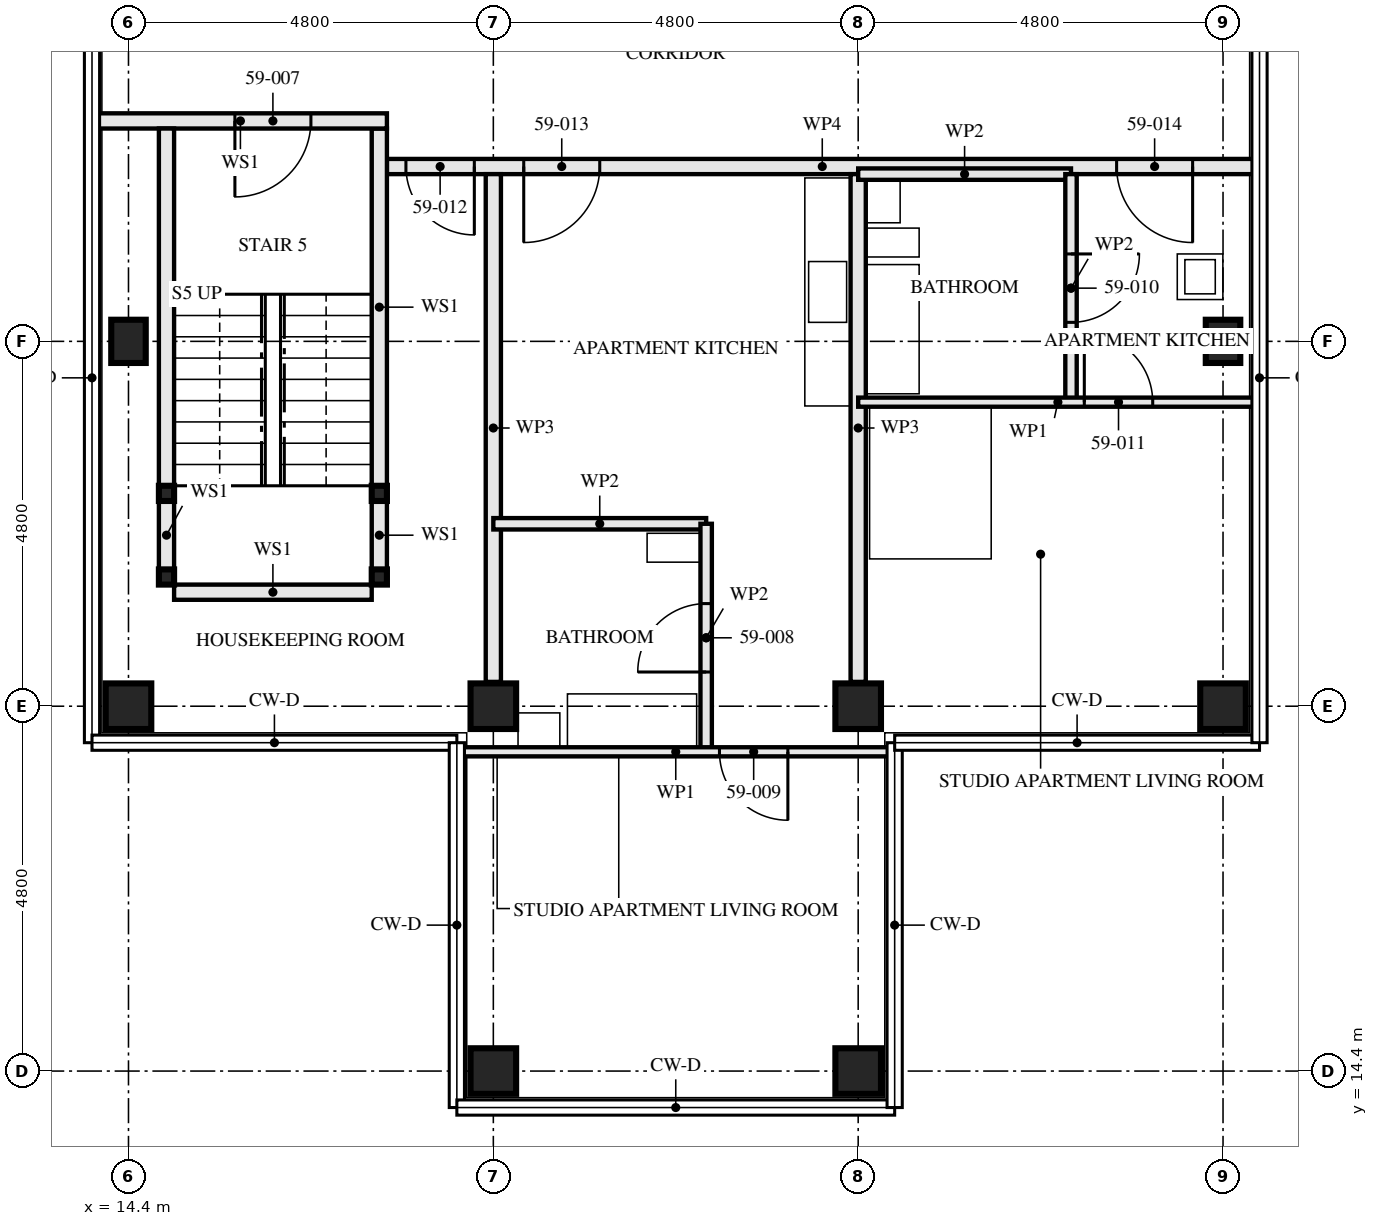
"""IFC4 building model, lengths in metres.
Left out: names, types, materials, properties, quantities, classifications, styles, units other than length and angle.
Written with IfcOpenShell. Run it as: python <this file> out.ifc"""

import sys

from ifc_helpers import new_model, si_unit, direction, frame, frame_2d, origin, origin_2d, place, context, subcontext, project, spatial, rectangle, hollow_rectangle, i_section, extrude, element, fill, save


model = new_model("IFC4")
c1 = context("Model", 3, precision=1e-05, world=origin(), true_north=direction((0.0, 1.0)))
c2 = subcontext(c1, "Body", "Model", "MODEL_VIEW")
j1 = project(units=[si_unit("LENGTHUNIT", "METRE"), si_unit("PLANEANGLEUNIT", "RADIAN")], contexts=[c1])
p1 = place(None, origin())
s1 = spatial("IfcSite", under=j1, at=p1, CompositionType="ELEMENT")
p2 = place(p1, origin())
s2 = spatial("IfcBuilding", under=s1, at=p2, CompositionType="ELEMENT")
p3 = place(p2, frame((0.0, 0.0, 215.5)))
s3 = spatial("IfcBuildingStorey", under=s2, at=p3, CompositionType="ELEMENT", Elevation=215.5)
p4 = place(p3, frame((14.4, 19.2, 0.0), z_axis=(0.0, 0.0, 1.0), x_axis=(0.0, 1.0, 0.0)))
e1 = element("IfcColumn", 1, at=p4, inside=s3, PredefinedType="COLUMN", context=c2, shape_type="SweptSolid", body=[
    extrude(hollow_rectangle(XDim=0.6, YDim=0.6, WallThickness=0.05, at=origin_2d()), origin(), (0.0, 0.0, 1.0), 3.5),
])
p5 = place(p3, frame((14.4, 24.0, 0.0), z_axis=(0.0, 0.0, 1.0), x_axis=(1.0, 0.0, 0.0)))
e2 = element("IfcColumn", 2, at=p5, inside=s3, PredefinedType="COLUMN", context=c2, shape_type="SweptSolid", body=[
    extrude(i_section(OverallWidth=0.454, OverallDepth=0.569, WebThickness=0.078, FlangeThickness=0.125, FilletRadius=0.015, at=origin_2d()), origin(), (0.0, 0.0, 1.0), 3.5),
])
for number, where, z_axis, x_axis in (
    (3, (19.2, 14.4, 0.0), (0.0, 0.0, 1.0), (0.0, 1.0, 0.0)),
    (4, (19.2, 19.2, 0.0), (0.0, 0.0, 1.0), (0.0, 1.0, 0.0)),
    (5, (24.0, 14.4, 0.0), (0.0, 0.0, 1.0), (0.0, 1.0, 0.0)),
    (6, (24.0, 19.2, 0.0), (0.0, 0.0, 1.0), (0.0, 1.0, 0.0)),
    (7, (28.8, 19.2, 0.0), (0.0, 0.0, 1.0), (0.0, 1.0, 0.0)),
):
    element("IfcColumn", number, at=place(p3, frame(where, z_axis=z_axis, x_axis=x_axis)), inside=s3, PredefinedType="COLUMN", context=c2, shape_type="SweptSolid", body=[
        extrude(hollow_rectangle(XDim=0.6, YDim=0.6, WallThickness=0.05, at=origin_2d()), origin(), (0.0, 0.0, 1.0), 3.5),
    ])
p6 = place(p3, frame((28.8, 24.0, 0.0), z_axis=(0.0, 0.0, 1.0), x_axis=(1.0, 0.0, 0.0)))
e8 = element("IfcColumn", 8, at=p6, inside=s3, PredefinedType="COLUMN", context=c2, shape_type="SweptSolid", body=[
    extrude(i_section(OverallWidth=0.454, OverallDepth=0.569, WebThickness=0.078, FlangeThickness=0.125, FilletRadius=0.015, at=origin_2d()), origin(), (0.0, 0.0, 1.0), 3.5),
])
for number, where, z_axis, x_axis in (
    (9, (14.9, 20.9, 0.0), (0.0, 0.0, 1.0), (1.0, 0.0, 0.0)),
    (10, (17.7, 20.9, 0.0), (0.0, 0.0, 1.0), (1.0, 0.0, 0.0)),
    (11, (14.9, 22.0, 0.0), (0.0, 0.0, 1.0), (1.0, 0.0, 0.0)),
    (12, (17.7, 22.0, 0.0), (0.0, 0.0, 1.0), (1.0, 0.0, 0.0)),
):
    element("IfcColumn", number, at=place(p3, frame(where, z_axis=z_axis, x_axis=x_axis)), inside=s3, PredefinedType="COLUMN", context=c2, shape_type="SweptSolid", body=[
        extrude(hollow_rectangle(XDim=0.2, YDim=0.2, WallThickness=0.008, at=origin_2d()), origin(), (0.0, 0.0, 1.0), 3.33),
    ])
p7 = place(p3, frame((14.9, 21.0, 0.0), z_axis=(0.0, 0.0, 1.0), x_axis=(0.0, 1.0, 0.0)))
e13 = element("IfcWall", 13, at=p7, inside=s3, PredefinedType="SOLIDWALL", context=c2, shape_type="SweptSolid", body=[
    extrude(rectangle(XDim=0.9, YDim=0.2, at=frame_2d((0.45, 0.0))), origin(), (0.0, 0.0, 1.0), 2.99),
])
p8 = place(p3, frame((14.9, 22.1, 0.0), z_axis=(0.0, 0.0, 1.0), x_axis=(0.0, 1.0, 0.0)))
e14 = element("IfcWall", 14, at=p8, inside=s3, PredefinedType="SOLIDWALL", context=c2, shape_type="SweptSolid", body=[
    extrude(rectangle(XDim=4.7, YDim=0.2, at=frame_2d((2.35, 0.0))), origin(), (0.0, 0.0, 1.0), 2.99),
])
p9 = place(p3, frame((17.7, 21.0, 0.0), z_axis=(0.0, 0.0, 1.0), x_axis=(0.0, 1.0, 0.0)))
e15 = element("IfcWall", 15, at=p9, inside=s3, PredefinedType="SOLIDWALL", context=c2, shape_type="SweptSolid", body=[
    extrude(rectangle(XDim=0.9, YDim=0.2, at=frame_2d((0.45, 0.0))), origin(), (0.0, 0.0, 1.0), 2.99),
])
p10 = place(p3, frame((17.7, 22.1, 0.0), z_axis=(0.0, 0.0, 1.0), x_axis=(0.0, 1.0, 0.0)))
e16 = element("IfcWall", 16, at=p10, inside=s3, PredefinedType="SOLIDWALL", context=c2, shape_type="SweptSolid", body=[
    extrude(rectangle(XDim=4.7, YDim=0.2, at=frame_2d((2.35, 0.0))), origin(), (0.0, 0.0, 1.0), 2.99),
])
p11 = place(p3, frame((15.0, 20.7, 0.0), z_axis=(0.0, 0.0, 1.0), x_axis=(1.0, 0.0, 0.0)))
e17 = element("IfcWall", 17, at=p11, inside=s3, PredefinedType="SOLIDWALL", context=c2, shape_type="SweptSolid", body=[
    extrude(rectangle(XDim=2.6, YDim=0.2, at=frame_2d((1.3, 0.0))), origin(), (0.0, 0.0, 1.0), 3.33),
])
p12 = place(p3, frame((13.945, 26.9, 0.0), z_axis=(0.0, 0.0, 1.0), x_axis=(1.0, 0.0, 0.0)))
e18 = element("IfcWall", 18, at=p12, inside=s3, PredefinedType="SOLIDWALL", context=c2, shape_type="SweptSolid", body=[
    extrude(rectangle(XDim=3.855, YDim=0.2, at=frame_2d((1.927, 0.0))), origin(), (0.0, 0.0, 1.0), 2.32),
])
p13 = place(p12, frame((1.855, 0.0, 0.0)))
e19 = element("IfcOpeningElement", 19, at=p13, cuts=e18, PredefinedType="OPENING", context=c2, shape_type="SweptSolid", body=[
    extrude(rectangle(XDim=1.0, YDim=2.1, at=frame_2d((0.5, 1.05))), frame((0.0, 0.111, 0.0), z_axis=(0.0, -1.0, 0.0), x_axis=(1.0, 0.0, 0.0)), (0.0, 0.0, 1.0), 0.221),
])
p14 = place(p3, frame((19.2, 19.52, 0.0), z_axis=(0.0, 0.0, 1.0), x_axis=(0.0, 1.0, 0.0)))
e20 = element("IfcWall", 20, at=p14, inside=s3, PredefinedType="PARTITIONING", context=c2, shape_type="SweptSolid", body=[
    extrude(rectangle(XDim=6.68, YDim=0.2, at=frame_2d((3.34, 0.0))), origin(), (0.0, 0.0, 1.0), 2.55),
])
p15 = place(p3, frame((22.0, 18.6, 0.0), z_axis=(0.0, 0.0, 1.0), x_axis=(0.0, 1.0, 0.0)))
e21 = element("IfcWall", 21, at=p15, inside=s3, PredefinedType="PARTITIONING", context=c2, shape_type="SweptSolid", body=[
    extrude(rectangle(XDim=3.0, YDim=0.15, at=frame_2d((1.5, 0.0))), origin(), (0.0, 0.0, 1.0), 2.55),
])
p16 = place(p15, frame((1.05, 0.0, 0.0)))
e22 = element("IfcOpeningElement", 22, at=p16, cuts=e21, PredefinedType="OPENING", context=c2, shape_type="SweptSolid", body=[
    extrude(rectangle(XDim=0.9, YDim=2.1, at=frame_2d((0.45, 1.05))), frame((0.0, 0.085, 0.0), z_axis=(0.0, -1.0, 0.0), x_axis=(1.0, 0.0, 0.0)), (0.0, 0.0, 1.0), 0.171),
])
p17 = place(p3, frame((19.2, 21.6, 0.0), z_axis=(0.0, 0.0, 1.0), x_axis=(1.0, 0.0, 0.0)))
e23 = element("IfcWall", 23, at=p17, inside=s3, PredefinedType="PARTITIONING", context=c2, shape_type="SweptSolid", body=[
    extrude(rectangle(XDim=2.8, YDim=0.15, at=frame_2d((1.4, 0.0))), origin(), (0.0, 0.0, 1.0), 3.33),
])
p18 = place(p3, frame((18.745, 18.6, 0.0), z_axis=(0.0, 0.0, 1.0), x_axis=(1.0, 0.0, 0.0)))
e24 = element("IfcWall", 24, at=p18, inside=s3, PredefinedType="PARTITIONING", context=c2, shape_type="SweptSolid", body=[
    extrude(rectangle(XDim=5.71, YDim=0.12, at=frame_2d((2.855, 0.0))), origin(), (0.0, 0.0, 1.0), 2.32),
])
p19 = place(p18, frame((3.43, 0.0, 0.0)))
e25 = element("IfcOpeningElement", 25, at=p19, cuts=e24, PredefinedType="OPENING", context=c2, shape_type="SweptSolid", body=[
    extrude(rectangle(XDim=0.9, YDim=2.1, at=frame_2d((0.45, 1.05))), frame((0.0, 0.071, 0.0), z_axis=(0.0, -1.0, 0.0), x_axis=(1.0, 0.0, 0.0)), (0.0, 0.0, 1.0), 0.141),
])
p20 = place(p3, frame((24.0, 19.52, 0.0), z_axis=(0.0, 0.0, 1.0), x_axis=(0.0, 1.0, 0.0)))
e26 = element("IfcWall", 26, at=p20, inside=s3, PredefinedType="PARTITIONING", context=c2, shape_type="SweptSolid", body=[
    extrude(rectangle(XDim=6.68, YDim=0.2, at=frame_2d((3.34, 0.0))), origin(), (0.0, 0.0, 1.0), 2.55),
])
p21 = place(p3, frame((26.8, 23.2, 0.0), z_axis=(0.0, 0.0, 1.0), x_axis=(0.0, 1.0, 0.0)))
e27 = element("IfcWall", 27, at=p21, inside=s3, PredefinedType="PARTITIONING", context=c2, shape_type="SweptSolid", body=[
    extrude(rectangle(XDim=3.0, YDim=0.15, at=frame_2d((1.5, 0.0))), origin(), (0.0, 0.0, 1.0), 2.55),
])
p22 = place(p21, frame((1.05, 0.0, 0.0)))
e28 = element("IfcOpeningElement", 28, at=p22, cuts=e27, PredefinedType="OPENING", context=c2, shape_type="SweptSolid", body=[
    extrude(rectangle(XDim=0.9, YDim=2.1, at=frame_2d((0.45, 1.05))), frame((0.0, 0.085, 0.0), z_axis=(0.0, -1.0, 0.0), x_axis=(1.0, 0.0, 0.0)), (0.0, 0.0, 1.0), 0.171),
])
p23 = place(p3, frame((24.0, 26.2, 0.0), z_axis=(0.0, 0.0, 1.0), x_axis=(1.0, 0.0, 0.0)))
e29 = element("IfcWall", 29, at=p23, inside=s3, PredefinedType="PARTITIONING", context=c2, shape_type="SweptSolid", body=[
    extrude(rectangle(XDim=2.8, YDim=0.15, at=frame_2d((1.4, 0.0))), origin(), (0.0, 0.0, 1.0), 3.33),
])
p24 = place(p3, frame((24.0, 23.2, 0.0), z_axis=(0.0, 0.0, 1.0), x_axis=(1.0, 0.0, 0.0)))
e30 = element("IfcWall", 30, at=p24, inside=s3, PredefinedType="PARTITIONING", context=c2, shape_type="SweptSolid", body=[
    extrude(rectangle(XDim=5.255, YDim=0.12, at=frame_2d((2.627, 0.0))), origin(), (0.0, 0.0, 1.0), 2.32),
])
p25 = place(p24, frame((2.975, 0.0, 0.0)))
e31 = element("IfcOpeningElement", 31, at=p25, cuts=e30, PredefinedType="OPENING", context=c2, shape_type="SweptSolid", body=[
    extrude(rectangle(XDim=0.9, YDim=2.1, at=frame_2d((0.45, 1.05))), frame((0.0, 0.071, 0.0), z_axis=(0.0, -1.0, 0.0), x_axis=(1.0, 0.0, 0.0)), (0.0, 0.0, 1.0), 0.141),
])
p26 = place(p3, frame((17.8, 26.3, 0.0), z_axis=(0.0, 0.0, 1.0), x_axis=(1.0, 0.0, 0.0)))
e32 = element("IfcWall", 32, at=p26, inside=s3, PredefinedType="PARTITIONING", context=c2, shape_type="SweptSolid", body=[
    extrude(rectangle(XDim=11.455, YDim=0.2, at=frame_2d((5.728, 0.0))), origin(), (0.0, 0.0, 1.0), 2.32),
])
p27 = place(p26, frame((0.25, 0.0, 0.0)))
e33 = element("IfcOpeningElement", 33, at=p27, cuts=e32, PredefinedType="OPENING", context=c2, shape_type="SweptSolid", body=[
    extrude(rectangle(XDim=0.9, YDim=2.1, at=frame_2d((0.45, 1.05))), frame((0.0, 0.111, 0.0), z_axis=(0.0, -1.0, 0.0), x_axis=(1.0, 0.0, 0.0)), (0.0, 0.0, 1.0), 0.221),
])
p28 = place(p26, frame((1.8, 0.0, 0.0)))
e34 = element("IfcOpeningElement", 34, at=p28, cuts=e32, PredefinedType="OPENING", context=c2, shape_type="SweptSolid", body=[
    extrude(rectangle(XDim=1.0, YDim=2.1, at=frame_2d((0.5, 1.05))), frame((0.0, 0.111, 0.0), z_axis=(0.0, -1.0, 0.0), x_axis=(1.0, 0.0, 0.0)), (0.0, 0.0, 1.0), 0.221),
])
p29 = place(p26, frame((9.6, 0.0, 0.0)))
e35 = element("IfcOpeningElement", 35, at=p29, cuts=e32, PredefinedType="OPENING", context=c2, shape_type="SweptSolid", body=[
    extrude(rectangle(XDim=1.0, YDim=2.1, at=frame_2d((0.5, 1.05))), frame((0.0, 0.111, 0.0), z_axis=(0.0, -1.0, 0.0), x_axis=(1.0, 0.0, 0.0)), (0.0, 0.0, 1.0), 0.221),
])
p30 = place(p13, frame((1.0, 0.0, 0.0), z_axis=(0.0, 0.0, 1.0), x_axis=(-1.0, 0.0, 0.0)))
e36 = element("IfcDoor", 36, at=p30, inside=s3, OperationType="SINGLE_SWING_LEFT", PredefinedType="DOOR", context=c2, shape_type="SweptSolid", body=[
    extrude(rectangle(XDim=1.0, YDim=2.1, at=frame_2d((0.5, 1.05))), frame((0.0, 0.032, 0.0), z_axis=(0.0, -1.0, 0.0), x_axis=(1.0, 0.0, 0.0)), (0.0, 0.0, 1.0), 0.064),
])
fill(e19, e36)
p31 = place(p16, origin())
e37 = element("IfcDoor", 37, at=p31, inside=s3, OperationType="SINGLE_SWING_RIGHT", PredefinedType="DOOR", context=c2, shape_type="SweptSolid", body=[
    extrude(rectangle(XDim=0.9, YDim=2.1, at=frame_2d((0.45, 1.05))), frame((0.0, 0.022, 0.0), z_axis=(0.0, -1.0, 0.0), x_axis=(1.0, 0.0, 0.0)), (0.0, 0.0, 1.0), 0.044),
])
fill(e22, e37)
p32 = place(p19, frame((0.9, 0.0, 0.0), z_axis=(0.0, 0.0, 1.0), x_axis=(-1.0, 0.0, 0.0)))
e38 = element("IfcDoor", 38, at=p32, inside=s3, OperationType="SINGLE_SWING_RIGHT", PredefinedType="DOOR", context=c2, shape_type="SweptSolid", body=[
    extrude(rectangle(XDim=0.9, YDim=2.1, at=frame_2d((0.45, 1.05))), frame((0.0, 0.022, 0.0), z_axis=(0.0, -1.0, 0.0), x_axis=(1.0, 0.0, 0.0)), (0.0, 0.0, 1.0), 0.044),
])
fill(e25, e38)
p33 = place(p22, frame((0.9, 0.0, 0.0), z_axis=(0.0, 0.0, 1.0), x_axis=(-1.0, 0.0, 0.0)))
e39 = element("IfcDoor", 39, at=p33, inside=s3, OperationType="SINGLE_SWING_RIGHT", PredefinedType="DOOR", context=c2, shape_type="SweptSolid", body=[
    extrude(rectangle(XDim=0.9, YDim=2.1, at=frame_2d((0.45, 1.05))), frame((0.0, 0.022, 0.0), z_axis=(0.0, -1.0, 0.0), x_axis=(1.0, 0.0, 0.0)), (0.0, 0.0, 1.0), 0.044),
])
fill(e28, e39)
p34 = place(p25, origin())
e40 = element("IfcDoor", 40, at=p34, inside=s3, OperationType="SINGLE_SWING_RIGHT", PredefinedType="DOOR", context=c2, shape_type="SweptSolid", body=[
    extrude(rectangle(XDim=0.9, YDim=2.1, at=frame_2d((0.45, 1.05))), frame((0.0, 0.022, 0.0), z_axis=(0.0, -1.0, 0.0), x_axis=(1.0, 0.0, 0.0)), (0.0, 0.0, 1.0), 0.044),
])
fill(e31, e40)
p35 = place(p27, frame((0.9, 0.0, 0.0), z_axis=(0.0, 0.0, 1.0), x_axis=(-1.0, 0.0, 0.0)))
e41 = element("IfcDoor", 41, at=p35, inside=s3, OperationType="SINGLE_SWING_RIGHT", PredefinedType="DOOR", context=c2, shape_type="SweptSolid", body=[
    extrude(rectangle(XDim=0.9, YDim=2.1, at=frame_2d((0.45, 1.05))), frame((0.0, 0.027, 0.0), z_axis=(0.0, -1.0, 0.0), x_axis=(1.0, 0.0, 0.0)), (0.0, 0.0, 1.0), 0.054),
])
fill(e33, e41)
p36 = place(p28, frame((1.0, 0.0, 0.0), z_axis=(0.0, 0.0, 1.0), x_axis=(-1.0, 0.0, 0.0)))
e42 = element("IfcDoor", 42, at=p36, inside=s3, OperationType="SINGLE_SWING_LEFT", PredefinedType="DOOR", context=c2, shape_type="SweptSolid", body=[
    extrude(rectangle(XDim=1.0, YDim=2.1, at=frame_2d((0.5, 1.05))), frame((0.0, 0.027, 0.0), z_axis=(0.0, -1.0, 0.0), x_axis=(1.0, 0.0, 0.0)), (0.0, 0.0, 1.0), 0.054),
])
fill(e34, e42)
p37 = place(p29, frame((1.0, 0.0, 0.0), z_axis=(0.0, 0.0, 1.0), x_axis=(-1.0, 0.0, 0.0)))
e43 = element("IfcDoor", 43, at=p37, inside=s3, OperationType="SINGLE_SWING_RIGHT", PredefinedType="DOOR", context=c2, shape_type="SweptSolid", body=[
    extrude(rectangle(XDim=1.0, YDim=2.1, at=frame_2d((0.5, 1.05))), frame((0.0, 0.027, 0.0), z_axis=(0.0, -1.0, 0.0), x_axis=(1.0, 0.0, 0.0)), (0.0, 0.0, 1.0), 0.054),
])
fill(e35, e43)
save(model, sys.argv[1])
